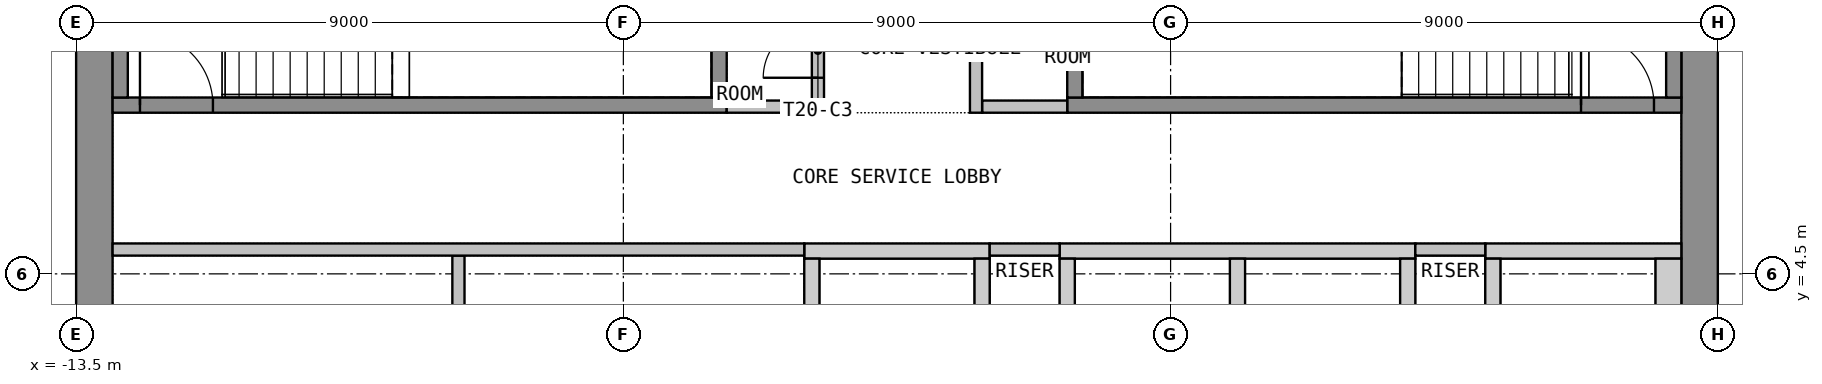
"""IFC4 building model, lengths in metres.
Left out: names, types, materials, properties, quantities, classifications, styles, units other than length and angle.
Written with IfcOpenShell. Run it as: python <this file> out.ifc"""

import sys

from ifc_helpers import new_model, si_unit, direction, frame, frame_2d, origin, place, context, subcontext, project, spatial, polyline, rectangle, outline, extrude, element, fill, save


model = new_model("IFC4")
c1 = context("Model", 3, precision=1e-05, world=origin(), true_north=direction((0.0, 1.0)))
c2 = subcontext(c1, "Body", "Model", "MODEL_VIEW")
j1 = project(units=[si_unit("LENGTHUNIT", "METRE"), si_unit("PLANEANGLEUNIT", "RADIAN")], contexts=[c1])
p1 = place(None, origin())
s1 = spatial("IfcSite", under=j1, at=p1, CompositionType="ELEMENT")
p2 = place(p1, origin())
s2 = spatial("IfcBuilding", under=s1, at=p2, CompositionType="ELEMENT")
p3 = place(p2, frame((0.0, 0.0, 270.3)))
s3 = spatial("IfcBuildingStorey", under=s2, at=p3, CompositionType="ELEMENT", Elevation=270.3)
p4 = place(p3, frame((-13.2, -10.65, 0.0), z_axis=(0.0, 0.0, 1.0), x_axis=(0.0, 1.0, 0.0)))
e1 = element("IfcWall", 1, at=p4, inside=s3, PredefinedType="SHEAR", context=c2, shape_type="SweptSolid", body=[
    extrude(rectangle(XDim=21.3, YDim=0.6, at=frame_2d((10.65, 0.0))), origin(), (0.0, 0.0, 1.0), 3.575),
])
p5 = place(p4, frame((9.45, 0.0, 0.0)))
e2 = element("IfcOpeningElement", 2, at=p5, cuts=e1, PredefinedType="OPENING", context=c2, shape_type="SweptSolid", body=[
    extrude(rectangle(XDim=2.4, YDim=2.1, at=frame_2d((1.2, 1.05))), frame((0.0, 0.31, 0.0), z_axis=(0.0, -1.0, 0.0), x_axis=(1.0, 0.0, 0.0)), (0.0, 0.0, 1.0), 0.62),
])
p6 = place(p3, frame((13.2, -10.65, 0.0), z_axis=(0.0, 0.0, 1.0), x_axis=(0.0, 1.0, 0.0)))
e3 = element("IfcWall", 3, at=p6, inside=s3, PredefinedType="SHEAR", context=c2, shape_type="SweptSolid", body=[
    extrude(rectangle(XDim=21.3, YDim=0.6, at=frame_2d((10.65, 0.0))), origin(), (0.0, 0.0, 1.0), 3.575),
])
p7 = place(p6, frame((9.45, 0.0, 0.0)))
e4 = element("IfcOpeningElement", 4, at=p7, cuts=e3, PredefinedType="OPENING", context=c2, shape_type="SweptSolid", body=[
    extrude(rectangle(XDim=2.4, YDim=2.1, at=frame_2d((1.2, 1.05))), frame((0.0, 0.31, 0.0), z_axis=(0.0, -1.0, 0.0), x_axis=(1.0, 0.0, 0.0)), (0.0, 0.0, 1.0), 0.62),
])
p8 = place(p3, origin())
e5 = element("IfcWall", 5, at=p8, inside=s3, PredefinedType="SHEAR", context=c2, shape_type="SweptSolid", body=[
    extrude(outline(polyline([(-1.525, 4.75), (1.525, 4.75), (1.525, 5.0), (-1.525, 5.0), (-1.525, 4.75)])), origin(), (0.0, 0.0, 1.0), 3.575),
])
p9 = place(p3, origin())
e6 = element("IfcWall", 6, at=p9, inside=s3, PredefinedType="SHEAR", context=c2, shape_type="SweptSolid", body=[
    extrude(outline(polyline([(2.675, 4.75), (8.525, 4.75), (8.525, 5.0), (2.675, 5.0), (2.675, 4.75)])), origin(), (0.0, 0.0, 1.0), 3.575),
])
p10 = place(p3, origin())
e7 = element("IfcWall", 7, at=p10, inside=s3, PredefinedType="SHEAR", context=c2, shape_type="SweptSolid", body=[
    extrude(outline(polyline([(9.675, 4.75), (12.9, 4.75), (12.9, 5.0), (9.675, 5.0), (9.675, 4.75)])), origin(), (0.0, 0.0, 1.0), 3.575),
])
p11 = place(p3, origin())
e8 = element("IfcWall", 8, at=p11, inside=s3, PredefinedType="SHEAR", context=c2, shape_type="SweptSolid", body=[
    extrude(outline(polyline([(-1.525, 2.05), (-1.275, 2.05), (-1.275, 4.75), (-1.525, 4.75), (-1.525, 2.05)])), origin(), (0.0, 0.0, 1.0), 3.575),
])
p12 = place(p3, origin())
e9 = element("IfcWall", 9, at=p12, inside=s3, PredefinedType="SHEAR", context=c2, shape_type="SweptSolid", body=[
    extrude(outline(polyline([(1.275, 2.05), (1.525, 2.05), (1.525, 4.75), (1.275, 4.75), (1.275, 2.05)])), origin(), (0.0, 0.0, 1.0), 3.575),
])
p13 = place(p3, origin())
e10 = element("IfcWall", 10, at=p13, inside=s3, PredefinedType="SHEAR", context=c2, shape_type="SweptSolid", body=[
    extrude(outline(polyline([(2.675, 2.05), (2.925, 2.05), (2.925, 4.75), (2.675, 4.75), (2.675, 2.05)])), origin(), (0.0, 0.0, 1.0), 3.575),
])
p14 = place(p3, origin())
e11 = element("IfcWall", 11, at=p14, inside=s3, PredefinedType="SHEAR", context=c2, shape_type="SweptSolid", body=[
    extrude(outline(polyline([(5.475, 2.05), (5.725, 2.05), (5.725, 4.75), (5.475, 4.75), (5.475, 2.05)])), origin(), (0.0, 0.0, 1.0), 3.575),
])
p15 = place(p3, origin())
e12 = element("IfcWall", 12, at=p15, inside=s3, PredefinedType="SHEAR", context=c2, shape_type="SweptSolid", body=[
    extrude(outline(polyline([(8.275, 2.05), (8.525, 2.05), (8.525, 4.75), (8.275, 4.75), (8.275, 2.05)])), origin(), (0.0, 0.0, 1.0), 3.575),
])
p16 = place(p3, origin())
e13 = element("IfcWall", 13, at=p16, inside=s3, PredefinedType="SHEAR", context=c2, shape_type="SweptSolid", body=[
    extrude(outline(polyline([(9.675, 2.05), (9.925, 2.05), (9.925, 4.75), (9.675, 4.75), (9.675, 2.05)])), origin(), (0.0, 0.0, 1.0), 3.575),
])
p17 = place(p3, origin())
e14 = element("IfcWall", 14, at=p17, inside=s3, PredefinedType="SHEAR", context=c2, shape_type="SweptSolid", body=[
    extrude(outline(polyline([(12.475, 2.05), (12.9, 2.05), (12.9, 4.75), (12.475, 4.75), (12.475, 2.05)])), origin(), (0.0, 0.0, 1.0), 3.575),
])
p18 = place(p3, frame((-12.9, 7.275, 0.0), z_axis=(0.0, 0.0, 1.0), x_axis=(1.0, 0.0, 0.0)))
e15 = element("IfcWall", 15, at=p18, inside=s3, PredefinedType="SHEAR", context=c2, shape_type="SweptSolid", body=[
    extrude(rectangle(XDim=10.1, YDim=0.25, at=frame_2d((5.05, 0.0))), origin(), (0.0, 0.0, 1.0), 3.575),
])
p19 = place(p18, frame((0.45, 0.0, 0.0)))
e16 = element("IfcOpeningElement", 16, at=p19, cuts=e15, PredefinedType="OPENING", context=c2, shape_type="SweptSolid", body=[
    extrude(rectangle(XDim=1.2, YDim=2.1, at=frame_2d((0.6, 1.05))), frame((0.0, 0.135, 0.0), z_axis=(0.0, -1.0, 0.0), x_axis=(1.0, 0.0, 0.0)), (0.0, 0.0, 1.0), 0.27),
])
for number, where, z_axis, x_axis in (
    (17, (-12.775, 7.4, 0.0), (0.0, 0.0, 1.0), (0.0, 1.0, 0.0)),
    (18, (-2.925, 7.4, 0.0), (0.0, 0.0, 1.0), (0.0, 1.0, 0.0)),
):
    element("IfcWall", number, at=place(p3, frame(where, z_axis=z_axis, x_axis=x_axis)), inside=s3, PredefinedType="SHEAR", context=c2, shape_type="SweptSolid", body=[
        extrude(rectangle(XDim=3.25, YDim=0.25, at=frame_2d((1.625, 0.0))), origin(), (0.0, 0.0, 1.0), 3.575),
    ])
p20 = place(p3, frame((2.8, 7.275, 0.0), z_axis=(0.0, 0.0, 1.0), x_axis=(1.0, 0.0, 0.0)))
e19 = element("IfcWall", 19, at=p20, inside=s3, PredefinedType="SHEAR", context=c2, shape_type="SweptSolid", body=[
    extrude(rectangle(XDim=10.1, YDim=0.25, at=frame_2d((5.05, 0.0))), origin(), (0.0, 0.0, 1.0), 3.575),
])
p21 = place(p20, frame((8.45, 0.0, 0.0)))
e20 = element("IfcOpeningElement", 20, at=p21, cuts=e19, PredefinedType="OPENING", context=c2, shape_type="SweptSolid", body=[
    extrude(rectangle(XDim=1.2, YDim=2.1, at=frame_2d((0.6, 1.05))), frame((0.0, 0.135, 0.0), z_axis=(0.0, -1.0, 0.0), x_axis=(1.0, 0.0, 0.0)), (0.0, 0.0, 1.0), 0.27),
])
for number, where, z_axis, x_axis in (
    (21, (2.925, 7.4, 0.0), (0.0, 0.0, 1.0), (0.0, 1.0, 0.0)),
    (22, (12.775, 7.4, 0.0), (0.0, 0.0, 1.0), (0.0, 1.0, 0.0)),
):
    element("IfcWall", number, at=place(p3, frame(where, z_axis=z_axis, x_axis=x_axis)), inside=s3, PredefinedType="SHEAR", context=c2, shape_type="SweptSolid", body=[
        extrude(rectangle(XDim=3.25, YDim=0.25, at=frame_2d((1.625, 0.0))), origin(), (0.0, 0.0, 1.0), 3.575),
    ])
for number, where, z_axis, x_axis in (
    (23, (-2.8, 7.25, 0.0), (0.0, 0.0, 1.0), (1.0, 0.0, 0.0)),
    (24, (1.4, 7.25, 0.0), (0.0, 0.0, 1.0), (1.0, 0.0, 0.0)),
):
    element("IfcWall", number, at=place(p3, frame(where, z_axis=z_axis, x_axis=x_axis)), inside=s3, PredefinedType="PARTITIONING", context=c2, shape_type="SweptSolid", body=[
        extrude(rectangle(XDim=1.4, YDim=0.2, at=frame_2d((0.7, 0.0))), origin(), (0.0, 0.0, 1.0), 3.575),
    ])
p22 = place(p3, frame((-1.3, 7.15, 0.0), z_axis=(0.0, 0.0, 1.0), x_axis=(0.0, 1.0, 0.0)))
e25 = element("IfcWall", 25, at=p22, inside=s3, PredefinedType="PARTITIONING", context=c2, shape_type="SweptSolid", body=[
    extrude(rectangle(XDim=3.5, YDim=0.2, at=frame_2d((1.75, 0.0))), origin(), (0.0, 0.0, 1.0), 3.575),
])
p23 = place(p22, frame((0.575, 0.0, 0.0)))
e26 = element("IfcOpeningElement", 26, at=p23, cuts=e25, PredefinedType="OPENING", context=c2, shape_type="SweptSolid", body=[
    extrude(rectangle(XDim=0.9, YDim=2.1, at=frame_2d((0.45, 1.05))), frame((0.0, 0.11, 0.0), z_axis=(0.0, -1.0, 0.0), x_axis=(1.0, 0.0, 0.0)), (0.0, 0.0, 1.0), 0.22),
])
p24 = place(p22, frame((2.225, 0.0, 0.0)))
e27 = element("IfcOpeningElement", 27, at=p24, cuts=e25, PredefinedType="OPENING", context=c2, shape_type="SweptSolid", body=[
    extrude(rectangle(XDim=0.9, YDim=2.1, at=frame_2d((0.45, 1.05))), frame((0.0, 0.11, 0.0), z_axis=(0.0, -1.0, 0.0), x_axis=(1.0, 0.0, 0.0)), (0.0, 0.0, 1.0), 0.22),
])
p25 = place(p3, frame((1.3, 7.15, 0.0), z_axis=(0.0, 0.0, 1.0), x_axis=(0.0, 1.0, 0.0)))
e28 = element("IfcWall", 28, at=p25, inside=s3, PredefinedType="PARTITIONING", context=c2, shape_type="SweptSolid", body=[
    extrude(rectangle(XDim=3.5, YDim=0.2, at=frame_2d((1.75, 0.0))), origin(), (0.0, 0.0, 1.0), 3.575),
])
p26 = place(p25, frame((1.4, 0.0, 0.0)))
e29 = element("IfcOpeningElement", 29, at=p26, cuts=e28, PredefinedType="OPENING", context=c2, shape_type="SweptSolid", body=[
    extrude(rectangle(XDim=0.9, YDim=2.1, at=frame_2d((0.45, 1.05))), frame((0.0, 0.11, 0.0), z_axis=(0.0, -1.0, 0.0), x_axis=(1.0, 0.0, 0.0)), (0.0, 0.0, 1.0), 0.22),
])
p27 = place(p3, frame((-7.212, 2.0, 0.0), z_axis=(0.0, 0.0, 1.0), x_axis=(0.0, 1.0, 0.0)))
e30 = element("IfcWall", 30, at=p27, inside=s3, PredefinedType="PARTITIONING", context=c2, shape_type="SweptSolid", body=[
    extrude(rectangle(XDim=2.8, YDim=0.2, at=frame_2d((1.4, 0.0))), origin(), (0.0, 0.0, 1.0), 3.575),
])
p28 = place(p3, frame((-12.9, 4.9, 0.0), z_axis=(0.0, 0.0, 1.0), x_axis=(1.0, 0.0, 0.0)))
e31 = element("IfcWall", 31, at=p28, inside=s3, PredefinedType="PARTITIONING", context=c2, shape_type="SweptSolid", body=[
    extrude(rectangle(XDim=11.375, YDim=0.2, at=frame_2d((5.688, 0.0))), origin(), (0.0, 0.0, 1.0), 3.575),
])
for number, where, z_axis, x_axis in (
    (32, (1.525, 4.9, 0.0), (0.0, 0.0, 1.0), (1.0, 0.0, 0.0)),
    (33, (8.525, 4.9, 0.0), (0.0, 0.0, 1.0), (1.0, 0.0, 0.0)),
):
    element("IfcWall", number, at=place(p3, frame(where, z_axis=z_axis, x_axis=x_axis)), inside=s3, PredefinedType="PARTITIONING", context=c2, shape_type="SweptSolid", body=[
        extrude(rectangle(XDim=1.15, YDim=0.2, at=frame_2d((0.575, 0.0))), origin(), (0.0, 0.0, 1.0), 3.575),
    ])
p29 = place(p19, origin())
e34 = element("IfcDoor", 34, at=p29, inside=s3, OperationType="SINGLE_SWING_LEFT", PredefinedType="DOOR", context=c2, shape_type="SweptSolid", body=[
    extrude(rectangle(XDim=1.2, YDim=2.1, at=frame_2d((0.6, 1.05))), frame((0.0, 0.025, 0.0), z_axis=(0.0, -1.0, 0.0), x_axis=(1.0, 0.0, 0.0)), (0.0, 0.0, 1.0), 0.05),
])
fill(e16, e34)
p30 = place(p21, origin())
e35 = element("IfcDoor", 35, at=p30, inside=s3, OperationType="SINGLE_SWING_LEFT", PredefinedType="DOOR", context=c2, shape_type="SweptSolid", body=[
    extrude(rectangle(XDim=1.2, YDim=2.1, at=frame_2d((0.6, 1.05))), frame((0.0, 0.025, 0.0), z_axis=(0.0, -1.0, 0.0), x_axis=(1.0, 0.0, 0.0)), (0.0, 0.0, 1.0), 0.05),
])
fill(e20, e35)
p31 = place(p23, origin())
e36 = element("IfcDoor", 36, at=p31, inside=s3, OperationType="SINGLE_SWING_LEFT", PredefinedType="DOOR", context=c2, shape_type="SweptSolid", body=[
    extrude(rectangle(XDim=0.9, YDim=2.1, at=frame_2d((0.45, 1.05))), frame((0.0, 0.025, 0.0), z_axis=(0.0, -1.0, 0.0), x_axis=(1.0, 0.0, 0.0)), (0.0, 0.0, 1.0), 0.05),
])
fill(e26, e36)
save(model, sys.argv[1])
